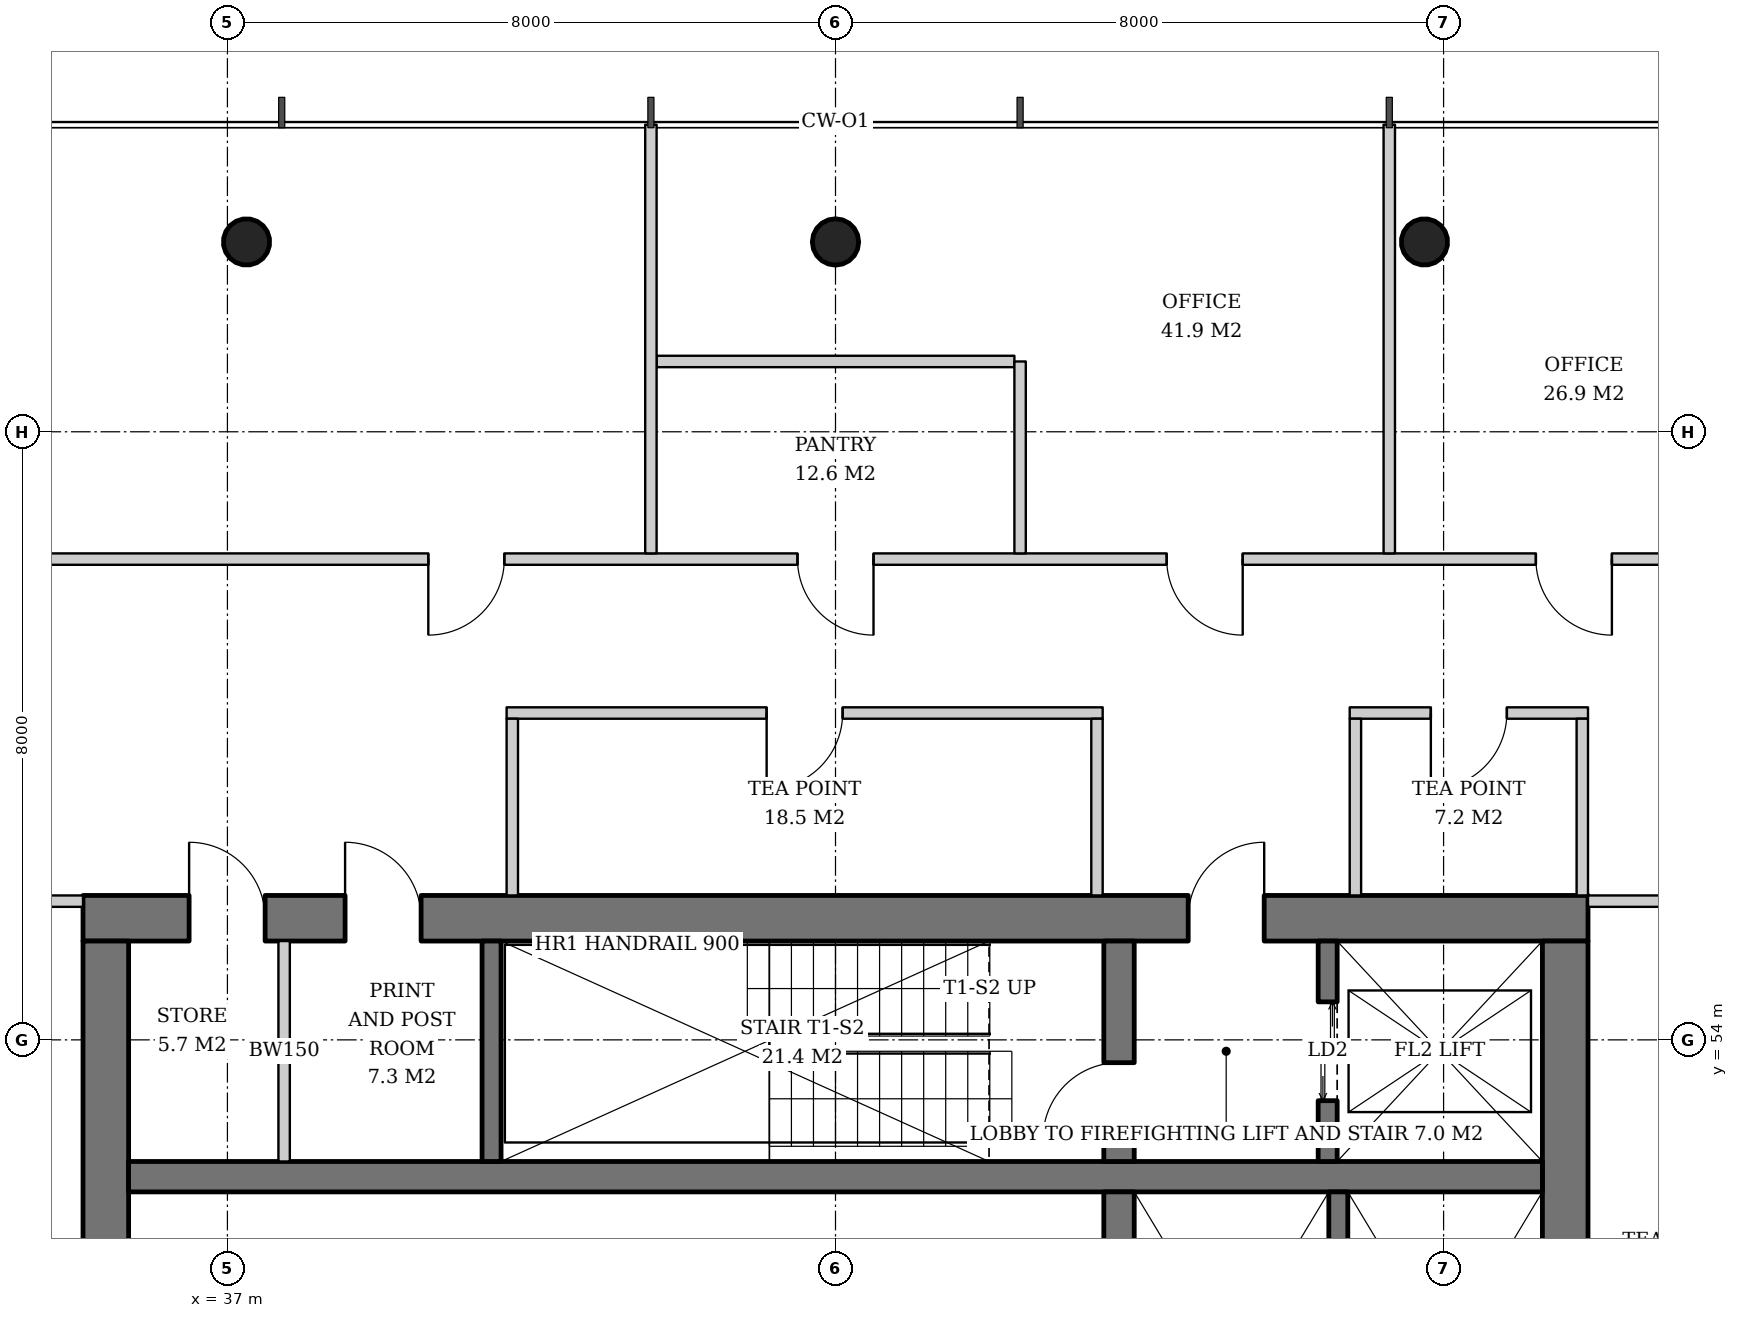
"""IFC4 building model, lengths in metres.
Left out: names, types, materials, properties, quantities, classifications, styles, units other than length and angle.
Written with IfcOpenShell. Run it as: python <this file> out.ifc"""

import sys

from ifc_helpers import new_model, si_unit, direction, frame, frame_2d, origin, origin_2d, place, context, subcontext, project, spatial, rectangle, hollow_circle, extrude, element, fill, save


model = new_model("IFC4")
c1 = context("Model", 3, precision=1e-05, world=origin(), true_north=direction((0.0, 1.0)))
c2 = subcontext(c1, "Body", "Model", "MODEL_VIEW")
j1 = project(units=[si_unit("LENGTHUNIT", "METRE"), si_unit("PLANEANGLEUNIT", "RADIAN")], contexts=[c1])
p1 = place(None, origin())
s1 = spatial("IfcSite", under=j1, at=p1, CompositionType="ELEMENT")
p2 = place(p1, origin())
s2 = spatial("IfcBuilding", under=s1, at=p2, CompositionType="ELEMENT")
p3 = place(p2, frame((0.0, 0.0, 192.0)))
s3 = spatial("IfcBuildingStorey", under=s2, at=p3, CompositionType="ELEMENT", Elevation=192.0)
p4 = place(p3, frame((52.768, 64.536, 0.0), z_axis=(-0.015987237665, -0.031910269556, 0.999362868496), x_axis=(0.894067115991, -0.447933021895, 0.0)))
e1 = element("IfcColumn", 1, at=p4, inside=s3, PredefinedType="COLUMN", context=c2, shape_type="SweptSolid", body=[
    extrude(hollow_circle(Radius=0.305, WallThickness=0.025, at=origin_2d()), origin(), (0.0, 0.0, 1.0), 3.802),
])
p5 = place(p3, frame((45.0, 64.536, 0.0), z_axis=(0.0, -0.031914348339, 0.999490607445), x_axis=(1.0, 0.0, 0.0)))
e2 = element("IfcColumn", 2, at=p5, inside=s3, PredefinedType="COLUMN", context=c2, shape_type="SweptSolid", body=[
    extrude(hollow_circle(Radius=0.305, WallThickness=0.025, at=origin_2d()), origin(), (0.0, 0.0, 1.0), 3.802),
])
p6 = place(p3, frame((37.232, 64.536, 0.0), z_axis=(0.015987237665, -0.031910269556, 0.999362868496), x_axis=(0.894067115991, 0.447933021895, 0.0)))
e3 = element("IfcColumn", 3, at=p6, inside=s3, PredefinedType="COLUMN", context=c2, shape_type="SweptSolid", body=[
    extrude(hollow_circle(Radius=0.305, WallThickness=0.025, at=origin_2d()), origin(), (0.0, 0.0, 1.0), 3.802),
])
p7 = place(p3, frame((35.1, 55.6, 0.0), z_axis=(0.0, 0.0, 1.0), x_axis=(1.0, 0.0, 0.0)))
e4 = element("IfcWall", 4, at=p7, inside=s3, PredefinedType="SHEAR", context=c2, shape_type="SweptSolid", body=[
    extrude(rectangle(XDim=19.8, YDim=0.6, at=frame_2d((9.9, 0.0))), origin(), (0.0, 0.0, 1.0), 3.8),
])
p8 = place(p7, frame((14.54, 0.0, 0.0)))
e5 = element("IfcOpeningElement", 5, at=p8, cuts=e4, PredefinedType="OPENING", context=c2, shape_type="SweptSolid", body=[
    extrude(rectangle(XDim=1.0, YDim=2.1, at=frame_2d((0.5, 1.05))), frame((0.0, 0.31, 0.0), z_axis=(0.0, -1.0, 0.0), x_axis=(1.0, 0.0, 0.0)), (0.0, 0.0, 1.0), 0.62),
])
p9 = place(p7, frame((1.396, 0.0, 0.0)))
e6 = element("IfcOpeningElement", 6, at=p9, cuts=e4, PredefinedType="OPENING", context=c2, shape_type="SweptSolid", body=[
    extrude(rectangle(XDim=1.0, YDim=2.1, at=frame_2d((0.5, 1.05))), frame((0.0, 0.31, 0.0), z_axis=(0.0, -1.0, 0.0), x_axis=(1.0, 0.0, 0.0)), (0.0, 0.0, 1.0), 0.62),
])
p10 = place(p7, frame((3.448, 0.0, 0.0)))
e7 = element("IfcOpeningElement", 7, at=p10, cuts=e4, PredefinedType="OPENING", context=c2, shape_type="SweptSolid", body=[
    extrude(rectangle(XDim=1.0, YDim=2.1, at=frame_2d((0.5, 1.05))), frame((0.0, 0.31, 0.0), z_axis=(0.0, -1.0, 0.0), x_axis=(1.0, 0.0, 0.0)), (0.0, 0.0, 1.0), 0.62),
])
p11 = place(p3, frame((35.4, 36.7, 0.0), z_axis=(0.0, 0.0, 1.0), x_axis=(0.0, 1.0, 0.0)))
e8 = element("IfcWall", 8, at=p11, inside=s3, PredefinedType="SHEAR", context=c2, shape_type="SweptSolid", body=[
    extrude(rectangle(XDim=18.6, YDim=0.6, at=frame_2d((9.3, 0.0))), origin(), (0.0, 0.0, 1.0), 3.8),
])
p12 = place(p11, frame((8.4, 0.0, 0.0)))
e9 = element("IfcOpeningElement", 9, at=p12, cuts=e8, PredefinedType="OPENING", context=c2, shape_type="SweptSolid", body=[
    extrude(rectangle(XDim=1.8, YDim=2.4, at=frame_2d((0.9, 1.2))), frame((0.0, 0.31, 0.0), z_axis=(0.0, -1.0, 0.0), x_axis=(1.0, 0.0, 0.0)), (0.0, 0.0, 1.0), 0.62),
])
p13 = place(p3, frame((54.6, 36.7, 0.0), z_axis=(0.0, 0.0, 1.0), x_axis=(0.0, 1.0, 0.0)))
e10 = element("IfcWall", 10, at=p13, inside=s3, PredefinedType="SHEAR", context=c2, shape_type="SweptSolid", body=[
    extrude(rectangle(XDim=18.6, YDim=0.6, at=frame_2d((9.3, 0.0))), origin(), (0.0, 0.0, 1.0), 3.8),
])
p14 = place(p13, frame((8.4, 0.0, 0.0)))
e11 = element("IfcOpeningElement", 11, at=p14, cuts=e10, PredefinedType="OPENING", context=c2, shape_type="SweptSolid", body=[
    extrude(rectangle(XDim=1.8, YDim=2.4, at=frame_2d((0.9, 1.2))), frame((0.0, 0.31, 0.0), z_axis=(0.0, -1.0, 0.0), x_axis=(1.0, 0.0, 0.0)), (0.0, 0.0, 1.0), 0.62),
])
p15 = place(p3, frame((35.7, 52.2, 0.0), z_axis=(0.0, 0.0, 1.0), x_axis=(1.0, 0.0, 0.0)))
e12 = element("IfcWall", 12, at=p15, inside=s3, PredefinedType="SHEAR", context=c2, shape_type="SweptSolid", body=[
    extrude(rectangle(XDim=18.6, YDim=0.4, at=frame_2d((9.3, 0.0))), origin(), (0.0, 0.0, 1.0), 3.8),
])
p16 = place(p3, frame((48.73, 40.0, 0.0), z_axis=(0.0, 0.0, 1.0), x_axis=(0.0, 1.0, 0.0)))
e13 = element("IfcWall", 13, at=p16, inside=s3, PredefinedType="SHEAR", context=c2, shape_type="SweptSolid", body=[
    extrude(rectangle(XDim=12.0, YDim=0.4, at=frame_2d((6.0, 0.0))), origin(), (0.0, 0.0, 1.0), 3.8),
])
p17 = place(p3, frame((48.73, 52.4, 0.0), z_axis=(0.0, 0.0, 1.0), x_axis=(0.0, 1.0, 0.0)))
e14 = element("IfcWall", 14, at=p17, inside=s3, PredefinedType="SHEAR", context=c2, shape_type="SweptSolid", body=[
    extrude(rectangle(XDim=2.9, YDim=0.4, at=frame_2d((1.45, 0.0))), origin(), (0.0, 0.0, 1.0), 3.8),
])
p18 = place(p17, frame((0.3, 0.0, 0.0)))
e15 = element("IfcOpeningElement", 15, at=p18, cuts=e14, PredefinedType="OPENING", context=c2, shape_type="SweptSolid", body=[
    extrude(rectangle(XDim=1.0, YDim=2.1, at=frame_2d((0.5, 1.05))), frame((0.0, 0.21, 0.0), z_axis=(0.0, -1.0, 0.0), x_axis=(1.0, 0.0, 0.0)), (0.0, 0.0, 1.0), 0.42),
])
p19 = place(p3, frame((40.475, 52.4, 0.0), z_axis=(0.0, 0.0, 1.0), x_axis=(0.0, 1.0, 0.0)))
e16 = element("IfcWall", 16, at=p19, inside=s3, PredefinedType="SHEAR", context=c2, shape_type="SweptSolid", body=[
    extrude(rectangle(XDim=2.9, YDim=0.25, at=frame_2d((1.45, 0.0))), origin(), (0.0, 0.0, 1.0), 3.8),
])
p20 = place(p3, frame((51.475, 52.4, 0.0), z_axis=(0.0, 0.0, 1.0), x_axis=(0.0, 1.0, 0.0)))
e17 = element("IfcWall", 17, at=p20, inside=s3, PredefinedType="SHEAR", context=c2, shape_type="SweptSolid", body=[
    extrude(rectangle(XDim=2.9, YDim=0.25, at=frame_2d((1.45, 0.0))), origin(), (0.0, 0.0, 1.0), 3.8),
])
p21 = place(p20, frame((0.8, 0.0, 0.0)))
e18 = element("IfcOpeningElement", 18, at=p21, cuts=e17, PredefinedType="OPENING", context=c2, shape_type="SweptSolid", body=[
    extrude(rectangle(XDim=1.3, YDim=2.2, at=frame_2d((0.65, 1.1))), frame((0.0, 0.135, 0.0), z_axis=(0.0, -1.0, 0.0), x_axis=(1.0, 0.0, 0.0)), (0.0, 0.0, 1.0), 0.27),
])
p22 = place(p3, frame((51.615, 47.75, 0.0), z_axis=(0.0, 0.0, 1.0), x_axis=(0.0, 1.0, 0.0)))
e19 = element("IfcWall", 19, at=p22, inside=s3, PredefinedType="SHEAR", context=c2, shape_type="SweptSolid", body=[
    extrude(rectangle(XDim=4.25, YDim=0.25, at=frame_2d((2.125, 0.0))), origin(), (0.0, 0.0, 1.0), 3.8),
])
p23 = place(p3, frame((37.746, 52.4, 0.0), z_axis=(0.0, 0.0, 1.0), x_axis=(0.0, 1.0, 0.0)))
e20 = element("IfcWall", 20, at=p23, inside=s3, PredefinedType="SOLIDWALL", context=c2, shape_type="SweptSolid", body=[
    extrude(rectangle(XDim=2.9, YDim=0.15, at=frame_2d((1.45, 0.0))), origin(), (0.0, 0.0, 1.0), 3.62),
])
p24 = place(p3, frame((54.9, 55.825, 0.0), z_axis=(0.0, 0.0, 1.0), x_axis=(1.0, 0.0, 0.0)))
e21 = element("IfcWall", 21, at=p24, inside=s3, PredefinedType="PARTITIONING", context=c2, shape_type="SweptSolid", body=[
    extrude(rectangle(XDim=2.325, YDim=0.15, at=frame_2d((1.163, 0.0))), origin(), (0.0, 0.0, 1.0), 3.62),
])
p25 = place(p3, frame((54.9, 58.3, 0.0), z_axis=(0.0, 0.0, 1.0), x_axis=(-1.0, 0.0, 0.0)))
e22 = element("IfcWall", 22, at=p25, inside=s3, PredefinedType="PARTITIONING", context=c2, shape_type="SweptSolid", body=[
    extrude(rectangle(XDim=3.135, YDim=0.15, at=frame_2d((1.567, 0.0))), origin(), (0.0, 0.0, 1.0), 2.92),
])
p26 = place(p25, frame((1.067, 0.0, 0.0)))
e23 = element("IfcOpeningElement", 23, at=p26, cuts=e22, PredefinedType="OPENING", context=c2, shape_type="SweptSolid", body=[
    extrude(rectangle(XDim=1.0, YDim=2.1, at=frame_2d((0.5, 1.05))), frame((0.0, 0.085, 0.0), z_axis=(0.0, -1.0, 0.0), x_axis=(1.0, 0.0, 0.0)), (0.0, 0.0, 1.0), 0.17),
])
p27 = place(p3, frame((54.825, 55.9, 0.0), z_axis=(0.0, 0.0, 1.0), x_axis=(0.0, 1.0, 0.0)))
e24 = element("IfcWall", 24, at=p27, inside=s3, PredefinedType="PARTITIONING", context=c2, shape_type="SweptSolid", body=[
    extrude(rectangle(XDim=2.325, YDim=0.15, at=frame_2d((1.163, 0.0))), origin(), (0.0, 0.0, 1.0), 2.867),
])
p28 = place(p3, frame((51.84, 55.9, 0.0), z_axis=(0.0, 0.0, 1.0), x_axis=(0.0, 1.0, 0.0)))
e25 = element("IfcWall", 25, at=p28, inside=s3, PredefinedType="PARTITIONING", context=c2, shape_type="SweptSolid", body=[
    extrude(rectangle(XDim=2.325, YDim=0.15, at=frame_2d((1.163, 0.0))), origin(), (0.0, 0.0, 1.0), 3.62),
])
p29 = place(p3, frame((48.515, 58.3, 0.0), z_axis=(0.0, 0.0, 1.0), x_axis=(-1.0, 0.0, 0.0)))
e26 = element("IfcWall", 26, at=p29, inside=s3, PredefinedType="PARTITIONING", context=c2, shape_type="SweptSolid", body=[
    extrude(rectangle(XDim=7.842, YDim=0.15, at=frame_2d((3.921, 0.0))), origin(), (0.0, 0.0, 1.0), 2.867),
])
p30 = place(p29, frame((3.421, 0.0, 0.0)))
e27 = element("IfcOpeningElement", 27, at=p30, cuts=e26, PredefinedType="OPENING", context=c2, shape_type="SweptSolid", body=[
    extrude(rectangle(XDim=1.0, YDim=2.1, at=frame_2d((0.5, 1.05))), frame((0.0, 0.085, 0.0), z_axis=(0.0, -1.0, 0.0), x_axis=(1.0, 0.0, 0.0)), (0.0, 0.0, 1.0), 0.17),
])
for number, where, z_axis, x_axis in (
    (28, (48.44, 55.9, 0.0), (0.0, 0.0, 1.0), (0.0, 1.0, 0.0)),
    (29, (40.748, 55.9, 0.0), (0.0, 0.0, 1.0), (0.0, 1.0, 0.0)),
):
    element("IfcWall", number, at=place(p3, frame(where, z_axis=z_axis, x_axis=x_axis)), inside=s3, PredefinedType="PARTITIONING", context=c2, shape_type="SweptSolid", body=[
        extrude(rectangle(XDim=2.325, YDim=0.15, at=frame_2d((1.163, 0.0))), origin(), (0.0, 0.0, 1.0), 3.62),
    ])
p31 = place(p3, frame((35.1, 55.825, 0.0), z_axis=(0.0, 0.0, 1.0), x_axis=(-1.0, 0.0, 0.0)))
e30 = element("IfcWall", 30, at=p31, inside=s3, PredefinedType="PARTITIONING", context=c2, shape_type="SweptSolid", body=[
    extrude(rectangle(XDim=2.325, YDim=0.15, at=frame_2d((1.163, 0.0))), origin(), (0.0, 0.0, 1.0), 2.867),
])
p32 = place(p3, frame((47.354, 62.925, 0.0), z_axis=(0.0, 0.0, 1.0), x_axis=(-1.0, 0.0, 0.0)))
e31 = element("IfcWall", 31, at=p32, inside=s3, PredefinedType="PARTITIONING", context=c2, shape_type="SweptSolid", body=[
    extrude(rectangle(XDim=4.707, YDim=0.15, at=frame_2d((2.354, 0.0))), origin(), (0.0, 0.0, 1.0), 2.867),
])
p33 = place(p3, frame((57.9, 60.325, 0.0), z_axis=(0.0, 0.0, 1.0), x_axis=(-1.0, 0.0, 0.0)))
e32 = element("IfcWall", 32, at=p33, inside=s3, PredefinedType="PARTITIONING", context=c2, shape_type="SweptSolid", body=[
    extrude(rectangle(XDim=25.8, YDim=0.15, at=frame_2d((12.9, 0.0))), origin(), (0.0, 0.0, 1.0), 2.867),
])
p34 = place(p33, frame((2.686, 0.0, 0.0)))
e33 = element("IfcOpeningElement", 33, at=p34, cuts=e32, PredefinedType="OPENING", context=c2, shape_type="SweptSolid", body=[
    extrude(rectangle(XDim=1.0, YDim=2.1, at=frame_2d((0.5, 1.05))), frame((0.0, 0.085, 0.0), z_axis=(0.0, -1.0, 0.0), x_axis=(1.0, 0.0, 0.0)), (0.0, 0.0, 1.0), 0.17),
])
p35 = place(p33, frame((7.543, 0.0, 0.0)))
e34 = element("IfcOpeningElement", 34, at=p35, cuts=e32, PredefinedType="OPENING", context=c2, shape_type="SweptSolid", body=[
    extrude(rectangle(XDim=1.0, YDim=2.1, at=frame_2d((0.5, 1.05))), frame((0.0, 0.085, 0.0), z_axis=(0.0, -1.0, 0.0), x_axis=(1.0, 0.0, 0.0)), (0.0, 0.0, 1.0), 0.17),
])
p36 = place(p33, frame((12.4, 0.0, 0.0)))
e35 = element("IfcOpeningElement", 35, at=p36, cuts=e32, PredefinedType="OPENING", context=c2, shape_type="SweptSolid", body=[
    extrude(rectangle(XDim=1.0, YDim=2.1, at=frame_2d((0.5, 1.05))), frame((0.0, 0.085, 0.0), z_axis=(0.0, -1.0, 0.0), x_axis=(1.0, 0.0, 0.0)), (0.0, 0.0, 1.0), 0.17),
])
p37 = place(p33, frame((17.257, 0.0, 0.0)))
e36 = element("IfcOpeningElement", 36, at=p37, cuts=e32, PredefinedType="OPENING", context=c2, shape_type="SweptSolid", body=[
    extrude(rectangle(XDim=1.0, YDim=2.1, at=frame_2d((0.5, 1.05))), frame((0.0, 0.085, 0.0), z_axis=(0.0, -1.0, 0.0), x_axis=(1.0, 0.0, 0.0)), (0.0, 0.0, 1.0), 0.17),
])
p38 = place(p3, frame((52.286, 60.4, 0.0), z_axis=(0.0, 0.0, 1.0), x_axis=(0.0, 1.0, 0.0)))
e37 = element("IfcWall", 37, at=p38, inside=s3, PredefinedType="PARTITIONING", context=c2, shape_type="SweptSolid", body=[
    extrude(rectangle(XDim=5.64, YDim=0.15, at=frame_2d((2.82, 0.0))), origin(), (0.0, 0.0, 1.0), 3.12),
])
p39 = place(p3, frame((47.428, 60.4, 0.0), z_axis=(0.0, 0.0, 1.0), x_axis=(0.0, 1.0, 0.0)))
e38 = element("IfcWall", 38, at=p39, inside=s3, PredefinedType="PARTITIONING", context=c2, shape_type="SweptSolid", body=[
    extrude(rectangle(XDim=2.525, YDim=0.15, at=frame_2d((1.263, 0.0))), origin(), (0.0, 0.0, 1.0), 3.62),
])
p40 = place(p3, frame((42.572, 60.4, 0.0), z_axis=(0.0, 0.0, 1.0), x_axis=(0.0, 1.0, 0.0)))
e39 = element("IfcWall", 39, at=p40, inside=s3, PredefinedType="PARTITIONING", context=c2, shape_type="SweptSolid", body=[
    extrude(rectangle(XDim=5.64, YDim=0.15, at=frame_2d((2.82, 0.0))), origin(), (0.0, 0.0, 1.0), 2.867),
])
p41 = place(p21, origin())
e40 = element("IfcDoor", 40, at=p41, inside=s3, OperationType="DOUBLE_DOOR_SLIDING", PredefinedType="DOOR", context=c2, shape_type="SweptSolid", body=[
    extrude(rectangle(XDim=1.3, YDim=2.2, at=frame_2d((0.65, 1.1))), frame((0.0, 0.025, 0.0), z_axis=(0.0, -1.0, 0.0), x_axis=(1.0, 0.0, 0.0)), (0.0, 0.0, 1.0), 0.05),
])
fill(e18, e40)
p42 = place(p18, origin())
e41 = element("IfcDoor", 41, at=p42, inside=s3, OperationType="SINGLE_SWING_LEFT", PredefinedType="DOOR", context=c2, shape_type="SweptSolid", body=[
    extrude(rectangle(XDim=1.0, YDim=2.1, at=frame_2d((0.5, 1.05))), frame((0.0, 0.025, 0.0), z_axis=(0.0, -1.0, 0.0), x_axis=(1.0, 0.0, 0.0)), (0.0, 0.0, 1.0), 0.05),
])
fill(e15, e41)
p43 = place(p8, origin())
e42 = element("IfcDoor", 42, at=p43, inside=s3, OperationType="SINGLE_SWING_RIGHT", PredefinedType="DOOR", context=c2, shape_type="SweptSolid", body=[
    extrude(rectangle(XDim=1.0, YDim=2.1, at=frame_2d((0.5, 1.05))), frame((0.0, 0.025, 0.0), z_axis=(0.0, -1.0, 0.0), x_axis=(1.0, 0.0, 0.0)), (0.0, 0.0, 1.0), 0.05),
])
fill(e5, e42)
p44 = place(p9, origin())
e43 = element("IfcDoor", 43, at=p44, inside=s3, OperationType="SINGLE_SWING_LEFT", PredefinedType="DOOR", context=c2, shape_type="SweptSolid", body=[
    extrude(rectangle(XDim=1.0, YDim=2.1, at=frame_2d((0.5, 1.05))), frame((0.0, -0.24, 0.0), z_axis=(0.0, -1.0, 0.0), x_axis=(1.0, 0.0, 0.0)), (0.0, 0.0, 1.0), 0.05),
])
fill(e6, e43)
p45 = place(p10, origin())
e44 = element("IfcDoor", 44, at=p45, inside=s3, OperationType="SINGLE_SWING_LEFT", PredefinedType="DOOR", context=c2, shape_type="SweptSolid", body=[
    extrude(rectangle(XDim=1.0, YDim=2.1, at=frame_2d((0.5, 1.05))), frame((0.0, -0.24, 0.0), z_axis=(0.0, -1.0, 0.0), x_axis=(1.0, 0.0, 0.0)), (0.0, 0.0, 1.0), 0.05),
])
fill(e7, e44)
p46 = place(p26, origin())
e45 = element("IfcDoor", 45, at=p46, inside=s3, OperationType="SINGLE_SWING_RIGHT", PredefinedType="DOOR", context=c2, shape_type="SweptSolid", body=[
    extrude(rectangle(XDim=1.0, YDim=2.1, at=frame_2d((0.5, 1.05))), frame((0.0, 0.025, 0.0), z_axis=(0.0, -1.0, 0.0), x_axis=(1.0, 0.0, 0.0)), (0.0, 0.0, 1.0), 0.05),
])
fill(e23, e45)
p47 = place(p30, origin())
e46 = element("IfcDoor", 46, at=p47, inside=s3, OperationType="SINGLE_SWING_RIGHT", PredefinedType="DOOR", context=c2, shape_type="SweptSolid", body=[
    extrude(rectangle(XDim=1.0, YDim=2.1, at=frame_2d((0.5, 1.05))), frame((0.0, 0.025, 0.0), z_axis=(0.0, -1.0, 0.0), x_axis=(1.0, 0.0, 0.0)), (0.0, 0.0, 1.0), 0.05),
])
fill(e27, e46)
p48 = place(p34, origin())
e47 = element("IfcDoor", 47, at=p48, inside=s3, OperationType="SINGLE_SWING_LEFT", PredefinedType="DOOR", context=c2, shape_type="SweptSolid", body=[
    extrude(rectangle(XDim=1.0, YDim=2.1, at=frame_2d((0.5, 1.05))), frame((0.0, 0.025, 0.0), z_axis=(0.0, -1.0, 0.0), x_axis=(1.0, 0.0, 0.0)), (0.0, 0.0, 1.0), 0.05),
])
fill(e33, e47)
p49 = place(p35, origin())
e48 = element("IfcDoor", 48, at=p49, inside=s3, OperationType="SINGLE_SWING_LEFT", PredefinedType="DOOR", context=c2, shape_type="SweptSolid", body=[
    extrude(rectangle(XDim=1.0, YDim=2.1, at=frame_2d((0.5, 1.05))), frame((0.0, 0.025, 0.0), z_axis=(0.0, -1.0, 0.0), x_axis=(1.0, 0.0, 0.0)), (0.0, 0.0, 1.0), 0.05),
])
fill(e34, e48)
p50 = place(p36, origin())
e49 = element("IfcDoor", 49, at=p50, inside=s3, OperationType="SINGLE_SWING_LEFT", PredefinedType="DOOR", context=c2, shape_type="SweptSolid", body=[
    extrude(rectangle(XDim=1.0, YDim=2.1, at=frame_2d((0.5, 1.05))), frame((0.0, 0.025, 0.0), z_axis=(0.0, -1.0, 0.0), x_axis=(1.0, 0.0, 0.0)), (0.0, 0.0, 1.0), 0.05),
])
fill(e35, e49)
p51 = place(p37, origin())
e50 = element("IfcDoor", 50, at=p51, inside=s3, OperationType="SINGLE_SWING_RIGHT", PredefinedType="DOOR", context=c2, shape_type="SweptSolid", body=[
    extrude(rectangle(XDim=1.0, YDim=2.1, at=frame_2d((0.5, 1.05))), frame((0.0, 0.025, 0.0), z_axis=(0.0, -1.0, 0.0), x_axis=(1.0, 0.0, 0.0)), (0.0, 0.0, 1.0), 0.05),
])
fill(e36, e50)
save(model, sys.argv[1])
